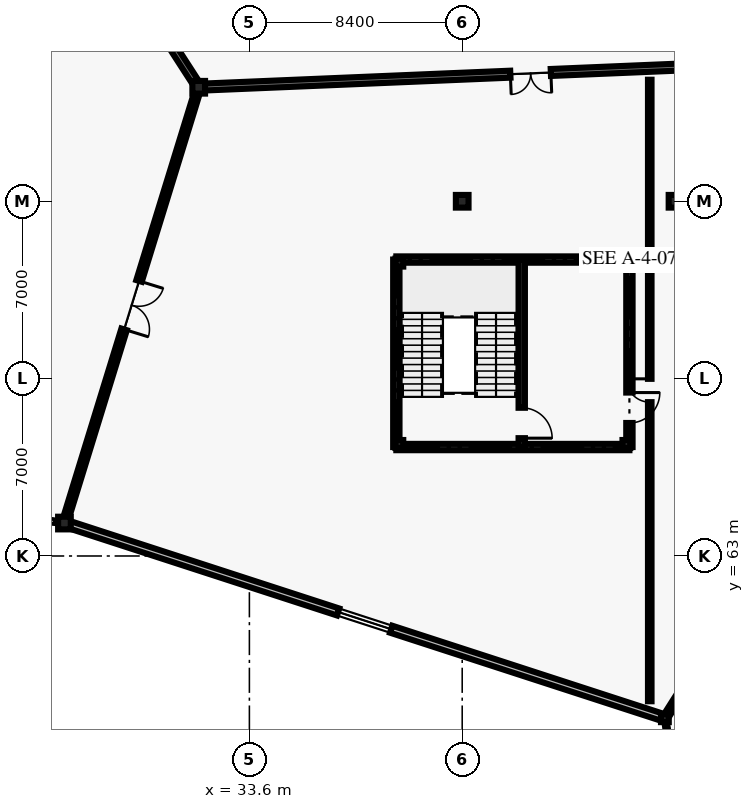
"""IFC4 building model, lengths in metres.
Left out: names, types, materials, properties, quantities, classifications, styles, units other than length and angle.
Written with IfcOpenShell. Run it as: python <this file> out.ifc"""

import sys

from ifc_helpers import new_model, si_unit, direction, frame, frame_2d, origin, origin_2d, place, context, subcontext, project, spatial, rectangle, i_section, extrude, element, fill, save


model = new_model("IFC4")
c1 = context("Model", 3, precision=1e-05, world=origin(), true_north=direction((0.0, 1.0)))
c2 = subcontext(c1, "Body", "Model", "MODEL_VIEW")
j1 = project(units=[si_unit("LENGTHUNIT", "METRE"), si_unit("PLANEANGLEUNIT", "RADIAN")], contexts=[c1])
p1 = place(None, origin())
s1 = spatial("IfcSite", under=j1, at=p1, CompositionType="ELEMENT")
p2 = place(p1, origin())
s2 = spatial("IfcBuilding", under=s1, at=p2, CompositionType="ELEMENT")
p3 = place(p2, frame((0.0, 0.0, 5.4)))
s3 = spatial("IfcBuildingStorey", under=s2, at=p3, CompositionType="ELEMENT", Elevation=5.4)
for number, where, z_axis, x_axis in (
    (1, (26.3, 64.3, 0.0), (0.0, 0.0, 1.0), (1.0, 0.0, 0.0)),
    (2, (31.6, 81.5, 0.0), (0.0, 0.0, 1.0), (1.0, 0.0, 0.0)),
):
    element("IfcColumn", number, at=place(p3, frame(where, z_axis=z_axis, x_axis=x_axis)), inside=s3, PredefinedType="COLUMN", context=c2, shape_type="SweptSolid", body=[
        extrude(rectangle(XDim=0.5, YDim=0.5, at=origin_2d()), origin(), (0.0, 0.0, 1.0), 4.8),
    ])
p4 = place(p3, frame((50.0, 56.6, 0.0), z_axis=(0.0, 0.0, 1.0), x_axis=(1.0, 0.0, 0.0)))
e3 = element("IfcColumn", 3, at=p4, inside=s3, PredefinedType="COLUMN", context=c2, shape_type="SweptSolid", body=[
    extrude(i_section(OverallWidth=0.307, OverallDepth=0.315, WebThickness=0.012, FlangeThickness=0.019, FilletRadius=0.017, at=origin_2d()), origin(), (0.0, 0.0, 1.0), 4.8),
])
for number, where, z_axis, x_axis in (
    (4, (42.0, 77.0, 0.0), (0.0, 0.0, 1.0), (1.0, 0.0, 0.0)),
    (5, (50.4, 77.0, 0.0), (0.0, 0.0, 1.0), (1.0, 0.0, 0.0)),
):
    element("IfcColumn", number, at=place(p3, frame(where, z_axis=z_axis, x_axis=x_axis)), inside=s3, PredefinedType="COLUMN", context=c2, shape_type="SweptSolid", body=[
        extrude(rectangle(XDim=0.5, YDim=0.5, at=origin_2d()), origin(), (0.0, 0.0, 1.0), 4.8),
    ])
for number, where, z_axis, x_axis in (
    (6, (39.52, 67.42, 0.0), (0.0, 0.0, 1.0), (1.0, 0.0, 0.0)),
    (7, (48.48, 67.42, 0.0), (0.0, 0.0, 1.0), (1.0, 0.0, 0.0)),
    (8, (48.48, 74.58, 0.0), (0.0, 0.0, 1.0), (1.0, 0.0, 0.0)),
    (9, (39.52, 74.58, 0.0), (0.0, 0.0, 1.0), (1.0, 0.0, 0.0)),
):
    element("IfcColumn", number, at=place(p3, frame(where, z_axis=z_axis, x_axis=x_axis)), inside=s3, PredefinedType="COLUMN", context=c2, shape_type="SweptSolid", body=[
        extrude(i_section(OverallWidth=0.307, OverallDepth=0.315, WebThickness=0.012, FlangeThickness=0.019, FilletRadius=0.017, at=origin_2d()), origin(), (0.0, 0.0, 1.0), 4.8),
    ])
p5 = place(p3, frame((50.068, 56.196, 0.0), z_axis=(0.0, 0.0, 1.0), x_axis=(-0.165554954509, 0.986200566334, 0.0)))
e10 = element("IfcWall", 10, at=p5, inside=s3, PredefinedType="SOLIDWALL", context=c2, shape_type="SweptSolid", body=[
    extrude(rectangle(XDim=0.308, YDim=0.095, at=frame_2d((0.154, 0.0))), origin(), (0.0, 0.0, 1.0), 3.62),
])
p6 = place(p3, frame((49.943, 56.619, 0.0), z_axis=(0.0, 0.0, 1.0), x_axis=(-0.951074357174, 0.308962080402, 0.0)))
e11 = element("IfcWall", 11, at=p6, inside=s3, PredefinedType="SOLIDWALL", context=c2, shape_type="SweptSolid", body=[
    extrude(rectangle(XDim=24.8, YDim=0.29, at=frame_2d((12.4, 0.0))), origin(), (0.0, 0.0, 1.0), 3.62),
])
p7 = place(p6, frame((11.3, 0.0, 0.95)))
e12 = element("IfcOpeningElement", 12, at=p7, cuts=e11, PredefinedType="OPENING", context=c2, shape_type="SweptSolid", body=[
    extrude(rectangle(XDim=2.2, YDim=2.1, at=frame_2d((1.1, 1.05))), frame((0.0, 0.155, 0.0), z_axis=(0.0, -1.0, 0.0), x_axis=(1.0, 0.0, 0.0)), (0.0, 0.0, 1.0), 0.31),
])
p8 = place(p3, frame((26.199, 64.314, 0.0), z_axis=(0.0, 0.0, 1.0), x_axis=(-0.991074779294, 0.133307096014, 0.0)))
e13 = element("IfcWall", 13, at=p8, inside=s3, PredefinedType="SOLIDWALL", context=c2, shape_type="SweptSolid", body=[
    extrude(rectangle(XDim=0.308, YDim=0.095, at=frame_2d((0.154, 0.0))), origin(), (0.0, 0.0, 1.0), 3.62),
])
p9 = place(p3, frame((60.5, 73.2, 0.0), z_axis=(0.0, 0.0, 1.0), x_axis=(-0.534570878454, -0.845123645338, 0.0)))
e14 = element("IfcWall", 14, at=p9, inside=s3, PredefinedType="SOLIDWALL", context=c2, shape_type="SweptSolid", body=[
    extrude(rectangle(XDim=19.642, YDim=0.225, at=frame_2d((9.821, 0.0))), origin(), (0.0, 0.0, 1.0), 4.02),
])
p10 = place(p9, frame((8.821, 0.0, 0.0)))
e15 = element("IfcOpeningElement", 15, at=p10, cuts=e14, PredefinedType="OPENING", context=c2, shape_type="SweptSolid", body=[
    extrude(rectangle(XDim=2.0, YDim=2.5, at=frame_2d((1.0, 1.25))), frame((0.0, 0.123, 0.0), z_axis=(0.0, -1.0, 0.0), x_axis=(1.0, 0.0, 0.0)), (0.0, 0.0, 1.0), 0.245),
])
p11 = place(p3, frame((57.8, 82.6, 0.0), z_axis=(0.0, 0.0, 1.0), x_axis=(-0.999119645224, -0.041951573605, 0.0)))
e16 = element("IfcWall", 16, at=p11, inside=s3, PredefinedType="SOLIDWALL", context=c2, shape_type="SweptSolid", body=[
    extrude(rectangle(XDim=26.223, YDim=0.275, at=frame_2d((13.112, 0.0))), origin(), (0.0, 0.0, 1.0), 4.02),
])
p12 = place(p11, frame((12.312, 0.0, 0.0)))
e17 = element("IfcOpeningElement", 17, at=p12, cuts=e16, PredefinedType="OPENING", context=c2, shape_type="SweptSolid", body=[
    extrude(rectangle(XDim=1.6, YDim=2.45, at=frame_2d((0.8, 1.225))), frame((0.0, 0.147, 0.0), z_axis=(0.0, -1.0, 0.0), x_axis=(1.0, 0.0, 0.0)), (0.0, 0.0, 1.0), 0.295),
])
p13 = place(p3, frame((31.6, 81.5, 0.0), z_axis=(0.0, 0.0, 1.0), x_axis=(-0.294479498062, -0.955657797133, 0.0)))
e18 = element("IfcWall", 18, at=p13, inside=s3, PredefinedType="SOLIDWALL", context=c2, shape_type="SweptSolid", body=[
    extrude(rectangle(XDim=17.998, YDim=0.225, at=frame_2d((8.999, 0.0))), origin(), (0.0, 0.0, 1.0), 4.02),
])
p14 = place(p13, frame((7.999, 0.0, 0.0)))
e19 = element("IfcOpeningElement", 19, at=p14, cuts=e18, PredefinedType="OPENING", context=c2, shape_type="SweptSolid", body=[
    extrude(rectangle(XDim=2.0, YDim=2.5, at=frame_2d((1.0, 1.25))), frame((0.0, 0.123, 0.0), z_axis=(0.0, -1.0, 0.0), x_axis=(1.0, 0.0, 0.0)), (0.0, 0.0, 1.0), 0.245),
])
p15 = place(p3, frame((27.4, 88.0, 0.0), z_axis=(0.0, 0.0, 1.0), x_axis=(0.542733189748, -0.839905164138, 0.0)))
e20 = element("IfcWall", 20, at=p15, inside=s3, PredefinedType="SOLIDWALL", context=c2, shape_type="SweptSolid", body=[
    extrude(rectangle(XDim=7.739, YDim=0.275, at=frame_2d((3.87, 0.0))), origin(), (0.0, 0.0, 1.0), 4.02),
])
p16 = place(p15, frame((3.069, 0.0, 0.0)))
e21 = element("IfcOpeningElement", 21, at=p16, cuts=e20, PredefinedType="OPENING", context=c2, shape_type="SweptSolid", body=[
    extrude(rectangle(XDim=1.6, YDim=2.45, at=frame_2d((0.8, 1.225))), frame((0.0, 0.147, 0.0), z_axis=(0.0, -1.0, 0.0), x_axis=(1.0, 0.0, 0.0)), (0.0, 0.0, 1.0), 0.295),
])
p17 = place(p3, frame((49.403, 57.267, 0.0), z_axis=(0.0, 0.0, 1.0), x_axis=(0.0, 1.0, 0.0)))
e22 = element("IfcWall", 22, at=p17, inside=s3, PredefinedType="PARTITIONING", context=c2, shape_type="SweptSolid", body=[
    extrude(rectangle(XDim=24.53, YDim=0.14, at=frame_2d((12.265, 0.0))), origin(), (0.0, 0.0, 1.0), 3.32),
])
p18 = place(p17, frame((11.805, 0.0, 0.0)))
e23 = element("IfcOpeningElement", 23, at=p18, cuts=e22, PredefinedType="OPENING", context=c2, shape_type="SweptSolid", body=[
    extrude(rectangle(XDim=0.92, YDim=2.1, at=frame_2d((0.46, 1.05))), frame((0.0, 0.08, 0.0), z_axis=(0.0, -1.0, 0.0), x_axis=(1.0, 0.0, 0.0)), (0.0, 0.0, 1.0), 0.16),
])
p19 = place(p3, frame((39.4, 67.3, 0.0), z_axis=(0.0, 0.0, 1.0), x_axis=(0.0, 1.0, 0.0)))
e24 = element("IfcWall", 24, at=p19, inside=s3, PredefinedType="SHEAR", context=c2, shape_type="SweptSolid", body=[
    extrude(rectangle(XDim=7.4, YDim=0.25, at=frame_2d((3.7, 0.0))), origin(), (0.0, 0.0, 1.0), 4.56),
])
for number, where, z_axis, x_axis in (
    (25, (39.4, 74.7, 0.0), (0.0, 0.0, 1.0), (1.0, 0.0, 0.0)),
    (26, (48.6, 67.3, 0.0), (0.0, 0.0, 1.0), (-1.0, 0.0, 0.0)),
):
    element("IfcWall", number, at=place(p3, frame(where, z_axis=z_axis, x_axis=x_axis)), inside=s3, PredefinedType="SHEAR", context=c2, shape_type="SweptSolid", body=[
        extrude(rectangle(XDim=9.2, YDim=0.25, at=frame_2d((4.6, 0.0))), origin(), (0.0, 0.0, 1.0), 4.56),
    ])
p20 = place(p3, frame((48.6, 74.7, 0.0), z_axis=(0.0, 0.0, 1.0), x_axis=(0.0, -1.0, 0.0)))
e27 = element("IfcWall", 27, at=p20, inside=s3, PredefinedType="SHEAR", context=c2, shape_type="SweptSolid", body=[
    extrude(rectangle(XDim=7.4, YDim=0.25, at=frame_2d((3.7, 0.0))), origin(), (0.0, 0.0, 1.0), 4.56),
])
p21 = place(p20, frame((5.25, 0.0, 0.0)))
e28 = element("IfcOpeningElement", 28, at=p21, cuts=e27, PredefinedType="OPENING", context=c2, shape_type="SweptSolid", body=[
    extrude(rectangle(XDim=1.2, YDim=2.2, at=frame_2d((0.6, 1.1))), frame((0.0, 0.135, 0.0), z_axis=(0.0, -1.0, 0.0), x_axis=(1.0, 0.0, 0.0)), (0.0, 0.0, 1.0), 0.27),
])
p22 = place(p3, frame((44.35, 74.7, 0.0), z_axis=(0.0, 0.0, 1.0), x_axis=(0.0, -1.0, 0.0)))
e29 = element("IfcWall", 29, at=p22, inside=s3, PredefinedType="SHEAR", context=c2, shape_type="SweptSolid", body=[
    extrude(rectangle(XDim=7.4, YDim=0.25, at=frame_2d((3.7, 0.0))), origin(), (0.0, 0.0, 1.0), 4.56),
])
p23 = place(p22, frame((5.85, 0.0, 0.0)))
e30 = element("IfcOpeningElement", 30, at=p23, cuts=e29, PredefinedType="OPENING", context=c2, shape_type="SweptSolid", body=[
    extrude(rectangle(XDim=1.2, YDim=2.2, at=frame_2d((0.6, 1.1))), frame((0.0, 0.135, 0.0), z_axis=(0.0, -1.0, 0.0), x_axis=(1.0, 0.0, 0.0)), (0.0, 0.0, 1.0), 0.27),
])
p24 = place(p7, origin())
e31 = element("IfcWindow", 31, at=p24, inside=s3, PartitioningType="SINGLE_PANEL", PredefinedType="WINDOW", context=c2, shape_type="SweptSolid", body=[
    extrude(rectangle(XDim=2.2, YDim=2.1, at=frame_2d((1.1, 1.05))), frame((0.0, 0.03, 0.0), z_axis=(0.0, -1.0, 0.0), x_axis=(1.0, 0.0, 0.0)), (0.0, 0.0, 1.0), 0.06),
])
fill(e12, e31)
p25 = place(p12, origin())
e32 = element("IfcDoor", 32, at=p25, inside=s3, OperationType="DOUBLE_DOOR_SINGLE_SWING", PredefinedType="DOOR", context=c2, shape_type="SweptSolid", body=[
    extrude(rectangle(XDim=1.6, YDim=2.45, at=frame_2d((0.8, 1.225))), frame((0.0, 0.025, 0.0), z_axis=(0.0, -1.0, 0.0), x_axis=(1.0, 0.0, 0.0)), (0.0, 0.0, 1.0), 0.05),
])
fill(e17, e32)
p26 = place(p14, origin())
e33 = element("IfcDoor", 33, at=p26, inside=s3, OperationType="DOUBLE_DOOR_SINGLE_SWING", PredefinedType="DOOR", context=c2, shape_type="SweptSolid", body=[
    extrude(rectangle(XDim=2.0, YDim=2.5, at=frame_2d((1.0, 1.25))), frame((0.0, 0.025, 0.0), z_axis=(0.0, -1.0, 0.0), x_axis=(1.0, 0.0, 0.0)), (0.0, 0.0, 1.0), 0.05),
])
fill(e19, e33)
p27 = place(p18, origin())
e34 = element("IfcDoor", 34, at=p27, inside=s3, OperationType="SINGLE_SWING_RIGHT", PredefinedType="DOOR", context=c2, shape_type="SweptSolid", body=[
    extrude(rectangle(XDim=0.92, YDim=2.1, at=frame_2d((0.46, 1.05))), frame((0.0, 0.025, 0.0), z_axis=(0.0, -1.0, 0.0), x_axis=(1.0, 0.0, 0.0)), (0.0, 0.0, 1.0), 0.05),
])
fill(e23, e34)
p28 = place(p21, origin())
e35 = element("IfcDoor", 35, at=p28, inside=s3, OperationType="SINGLE_SWING_LEFT", PredefinedType="DOOR", context=c2, shape_type="SweptSolid", body=[
    extrude(rectangle(XDim=1.2, YDim=2.2, at=frame_2d((0.6, 1.1))), frame((0.0, 0.025, 0.0), z_axis=(0.0, -1.0, 0.0), x_axis=(1.0, 0.0, 0.0)), (0.0, 0.0, 1.0), 0.05),
])
fill(e28, e35)
p29 = place(p23, origin())
e36 = element("IfcDoor", 36, at=p29, inside=s3, OperationType="SINGLE_SWING_RIGHT", PredefinedType="DOOR", context=c2, shape_type="SweptSolid", body=[
    extrude(rectangle(XDim=1.2, YDim=2.2, at=frame_2d((0.6, 1.1))), frame((0.0, 0.025, 0.0), z_axis=(0.0, -1.0, 0.0), x_axis=(1.0, 0.0, 0.0)), (0.0, 0.0, 1.0), 0.05),
])
fill(e30, e36)
save(model, sys.argv[1])
